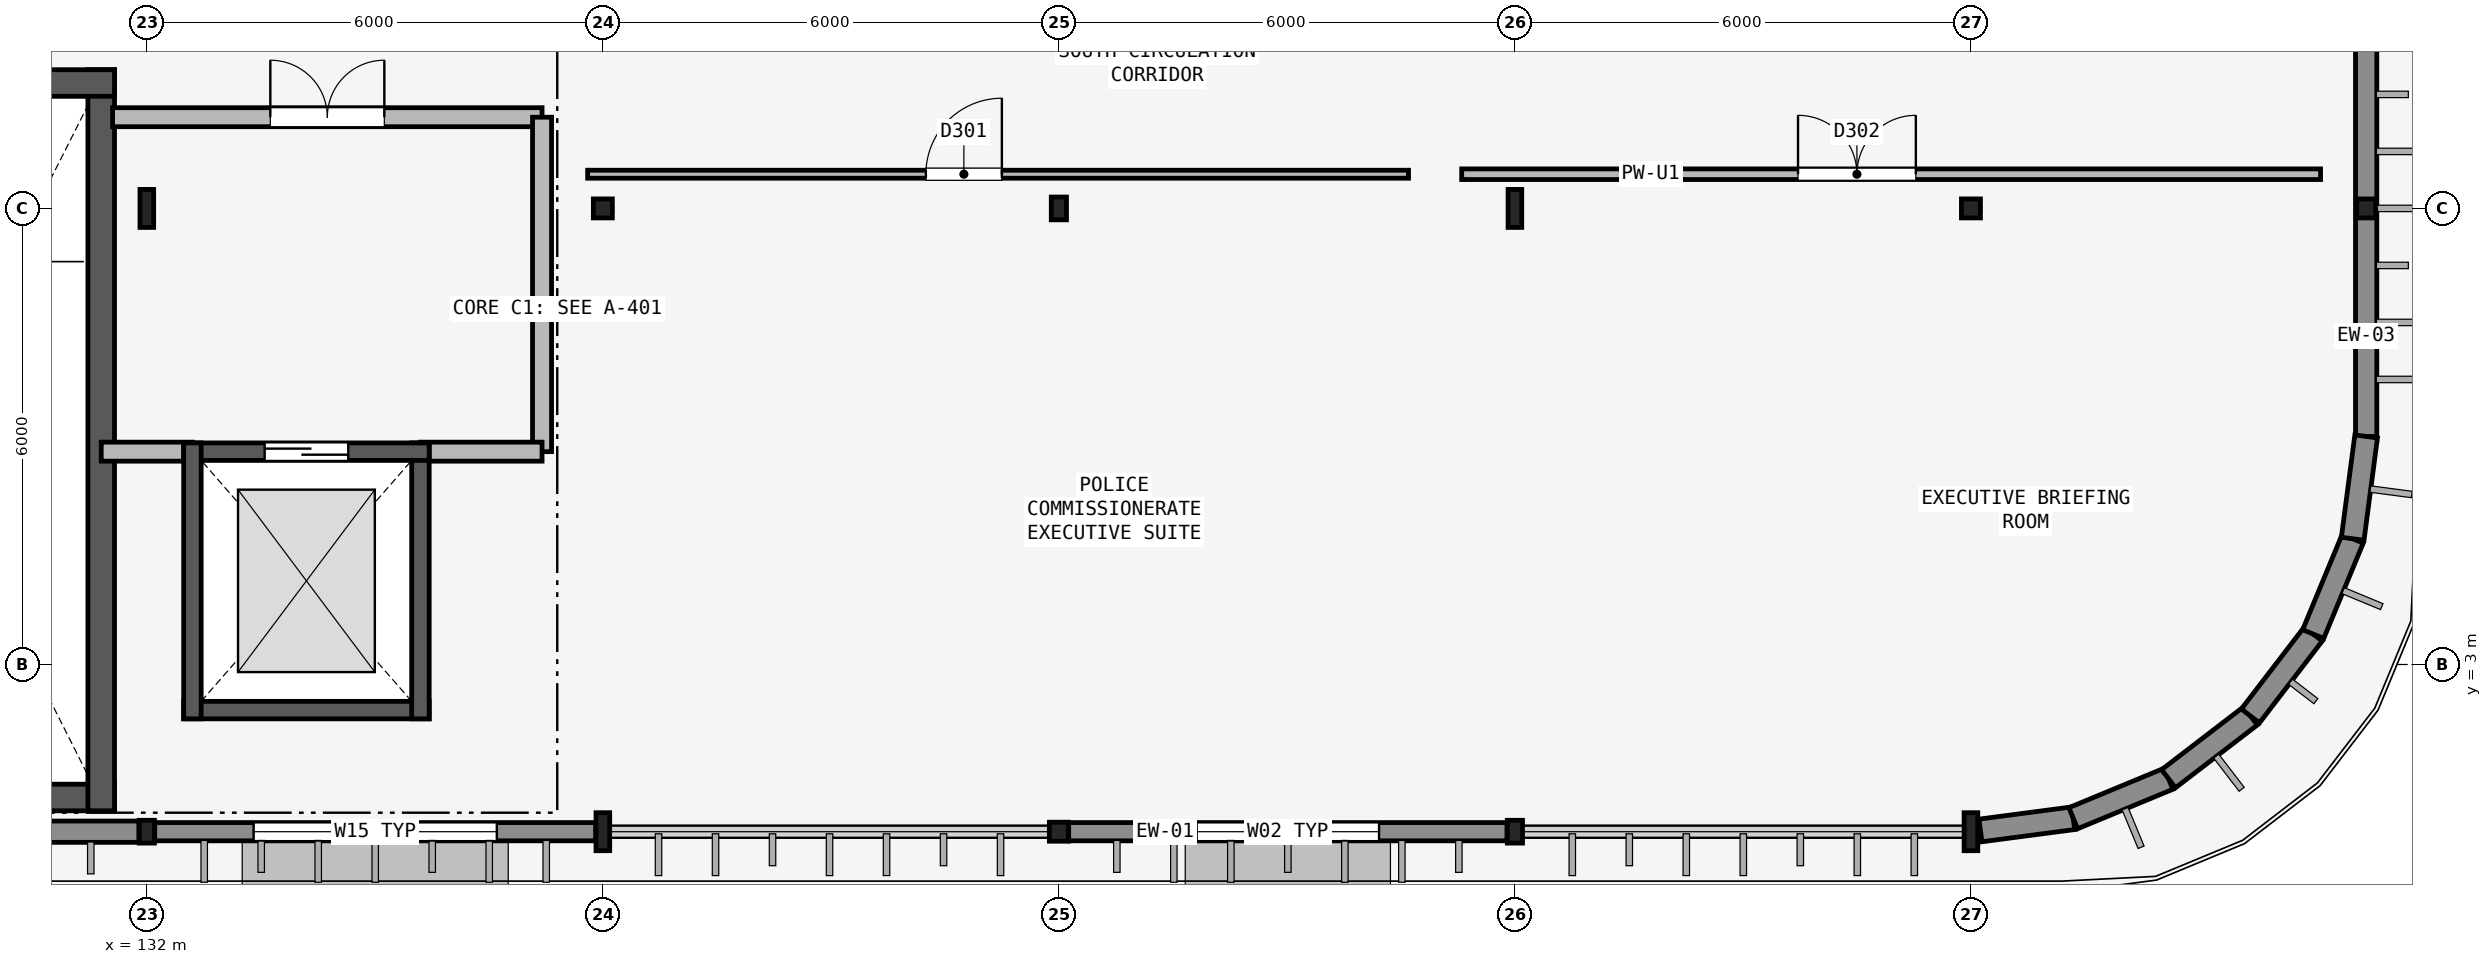
"""IFC4 building model, lengths in metres.
Left out: names, types, materials, properties, quantities, classifications, styles, units other than length and angle.
Written with IfcOpenShell. Run it as: python <this file> out.ifc"""

import sys

from ifc_helpers import new_model, si_unit, direction, frame, frame_2d, origin, origin_2d, place, context, subcontext, project, spatial, rectangle, hollow_rectangle, i_section, extrude, element, fill, save


model = new_model("IFC4")
c1 = context("Model", 3, precision=1e-05, world=origin(), true_north=direction((0.0, 1.0)))
c2 = subcontext(c1, "Body", "Model", "MODEL_VIEW")
j1 = project(units=[si_unit("LENGTHUNIT", "METRE"), si_unit("PLANEANGLEUNIT", "RADIAN")], contexts=[c1])
p1 = place(None, origin())
s1 = spatial("IfcSite", under=j1, at=p1, CompositionType="ELEMENT")
p2 = place(p1, origin())
s2 = spatial("IfcBuilding", under=s1, at=p2, CompositionType="ELEMENT")
p3 = place(p2, frame((0.0, 0.0, 30.0)))
s3 = spatial("IfcBuildingStorey", under=s2, at=p3, CompositionType="ELEMENT", Elevation=30.0)
p4 = place(p3, frame((132.0, 0.8, 0.0), z_axis=(0.0, 0.0, 1.0), x_axis=(1.0, 0.0, 0.0)))
e1 = element("IfcColumn", 1, at=p4, inside=s3, PredefinedType="COLUMN", context=c2, shape_type="SweptSolid", body=[
    extrude(hollow_rectangle(XDim=0.2, YDim=0.3, WallThickness=0.012, InnerFilletRadius=0.012, OuterFilletRadius=0.024, at=origin_2d()), origin(), (0.0, 0.0, 1.0), 4.2),
])
for number, where, z_axis, x_axis in (
    (2, (132.0, 9.0, 0.0), (0.0, 0.0, 1.0), (1.0, 0.0, 0.0)),
    (3, (138.0, 0.8, 0.0), (0.0, 0.0, 1.0), (1.0, 0.0, 0.0)),
):
    element("IfcColumn", number, at=place(p3, frame(where, z_axis=z_axis, x_axis=x_axis)), inside=s3, PredefinedType="COLUMN", context=c2, shape_type="SweptSolid", body=[
        extrude(i_section(OverallWidth=0.18, OverallDepth=0.5, WebThickness=0.01, FlangeThickness=0.017, FilletRadius=0.017, at=origin_2d()), origin(), (0.0, 0.0, 1.0), 4.2),
    ])
for number, where, z_axis, x_axis in (
    (4, (138.0, 9.0, 0.0), (0.0, 0.0, 1.0), (1.0, 0.0, 0.0)),
    (5, (144.0, 0.8, 0.0), (0.0, 0.0, 1.0), (1.0, 0.0, 0.0)),
):
    element("IfcColumn", number, at=place(p3, frame(where, z_axis=z_axis, x_axis=x_axis)), inside=s3, PredefinedType="COLUMN", context=c2, shape_type="SweptSolid", body=[
        extrude(hollow_rectangle(XDim=0.25, YDim=0.25, WallThickness=0.012, InnerFilletRadius=0.012, OuterFilletRadius=0.024, at=origin_2d()), origin(), (0.0, 0.0, 1.0), 4.2),
    ])
for number, where, z_axis, x_axis in (
    (6, (144.0, 9.0, 0.0), (0.0, 0.0, 1.0), (1.0, 0.0, 0.0)),
    (7, (150.0, 0.8, 0.0), (0.0, 0.0, 1.0), (1.0, 0.0, 0.0)),
):
    element("IfcColumn", number, at=place(p3, frame(where, z_axis=z_axis, x_axis=x_axis)), inside=s3, PredefinedType="COLUMN", context=c2, shape_type="SweptSolid", body=[
        extrude(hollow_rectangle(XDim=0.2, YDim=0.3, WallThickness=0.012, InnerFilletRadius=0.012, OuterFilletRadius=0.024, at=origin_2d()), origin(), (0.0, 0.0, 1.0), 4.2),
    ])
for number, where, z_axis, x_axis in (
    (8, (150.0, 9.0, 0.0), (0.0, 0.0, 1.0), (1.0, 0.0, 0.0)),
    (9, (156.0, 0.8, 0.0), (0.0, 0.0, 1.0), (1.0, 0.0, 0.0)),
):
    element("IfcColumn", number, at=place(p3, frame(where, z_axis=z_axis, x_axis=x_axis)), inside=s3, PredefinedType="COLUMN", context=c2, shape_type="SweptSolid", body=[
        extrude(i_section(OverallWidth=0.18, OverallDepth=0.5, WebThickness=0.01, FlangeThickness=0.017, FilletRadius=0.017, at=origin_2d()), origin(), (0.0, 0.0, 1.0), 4.2),
    ])
for number, where, z_axis, x_axis in (
    (10, (156.0, 9.0, 0.0), (0.0, 0.0, 1.0), (1.0, 0.0, 0.0)),
    (11, (161.2, 9.0, 0.0), (0.0, 0.0, 1.0), (1.0, 0.0, 0.0)),
):
    element("IfcColumn", number, at=place(p3, frame(where, z_axis=z_axis, x_axis=x_axis)), inside=s3, PredefinedType="COLUMN", context=c2, shape_type="SweptSolid", body=[
        extrude(hollow_rectangle(XDim=0.25, YDim=0.25, WallThickness=0.012, InnerFilletRadius=0.012, OuterFilletRadius=0.024, at=origin_2d()), origin(), (0.0, 0.0, 1.0), 4.2),
    ])
p5 = place(p3, frame((126.129, 0.8, 0.0), z_axis=(0.0, 0.0, 1.0), x_axis=(1.0, 0.0, 0.0)))
e12 = element("IfcWall", 12, at=p5, inside=s3, PredefinedType="SOLIDWALL", context=c2, shape_type="SweptSolid", body=[
    extrude(rectangle(XDim=5.767, YDim=0.28, at=frame_2d((2.884, 0.0))), origin(), (0.0, 0.0, 1.0), 3.624),
])
p6 = place(p3, frame((132.104, 0.8, 0.0), z_axis=(0.0, 0.0, 1.0), x_axis=(1.0, 0.0, 0.0)))
e13 = element("IfcWall", 13, at=p6, inside=s3, PredefinedType="SOLIDWALL", context=c2, shape_type="SweptSolid", body=[
    extrude(rectangle(XDim=5.802, YDim=0.24, at=frame_2d((2.901, 0.0))), origin(), (0.0, 0.0, 1.0), 3.624),
])
p7 = place(p6, frame((1.301, 0.0, 0.8)))
e14 = element("IfcOpeningElement", 14, at=p7, cuts=e13, PredefinedType="OPENING", context=c2, shape_type="SweptSolid", body=[
    extrude(rectangle(XDim=3.2, YDim=1.8, at=frame_2d((1.6, 0.9))), frame((0.0, 0.13, 0.0), z_axis=(0.0, -1.0, 0.0), x_axis=(1.0, 0.0, 0.0)), (0.0, 0.0, 1.0), 0.26),
])
p8 = place(p3, frame((144.129, 0.8, 0.0), z_axis=(0.0, 0.0, 1.0), x_axis=(1.0, 0.0, 0.0)))
e15 = element("IfcWall", 15, at=p8, inside=s3, PredefinedType="SOLIDWALL", context=c2, shape_type="SweptSolid", body=[
    extrude(rectangle(XDim=5.767, YDim=0.24, at=frame_2d((2.884, 0.0))), origin(), (0.0, 0.0, 1.0), 3.624),
])
p9 = place(p8, frame((1.684, 0.0, 0.9)))
e16 = element("IfcOpeningElement", 16, at=p9, cuts=e15, PredefinedType="OPENING", context=c2, shape_type="SweptSolid", body=[
    extrude(rectangle(XDim=2.4, YDim=1.5, at=frame_2d((1.2, 0.75))), frame((0.0, 0.13, 0.0), z_axis=(0.0, -1.0, 0.0), x_axis=(1.0, 0.0, 0.0)), (0.0, 0.0, 1.0), 0.26),
])
p10 = place(p3, frame((161.2, 6.0, 0.0), z_axis=(0.0, 0.0, 1.0), x_axis=(0.0, 1.0, 0.0)))
e17 = element("IfcWall", 17, at=p10, inside=s3, PredefinedType="SOLIDWALL", context=c2, shape_type="SweptSolid", body=[
    extrude(rectangle(XDim=6.0, YDim=0.28, at=frame_2d((3.0, 0.0))), origin(), (0.0, 0.0, 1.0), 3.58),
])
p11 = place(p3, frame((156.125, 0.816, 0.0), z_axis=(0.0, 0.0, 1.0), x_axis=(0.991432693702, 0.130618581597, 0.0)))
e18 = element("IfcWall", 18, at=p11, inside=s3, PredefinedType="SOLIDWALL", context=c2, shape_type="SweptSolid", body=[
    extrude(rectangle(XDim=1.232, YDim=0.3, at=frame_2d((0.616, 0.0))), origin(), (0.0, 0.0, 1.0), 3.624),
])
for number, where, z_axis, x_axis in (
    (19, (157.346, 0.977, 0.0), (0.0, 0.0, 1.0), (0.924, 0.383, 0.0)),
    (20, (158.6, 1.497, 0.0), (0.0, 0.0, 1.0), (0.793, 0.609, 0.0)),
    (21, (159.677, 2.323, 0.0), (0.0, 0.0, 1.0), (0.609, 0.793, 0.0)),
    (22, (160.503, 3.4, 0.0), (0.0, 0.0, 1.0), (0.383, 0.924, 0.0)),
):
    element("IfcWall", number, at=place(p3, frame(where, z_axis=z_axis, x_axis=x_axis)), inside=s3, PredefinedType="SOLIDWALL", context=c2, shape_type="SweptSolid", body=[
        extrude(rectangle(XDim=1.357, YDim=0.3, at=frame_2d((0.679, 0.0))), origin(), (0.0, 0.0, 1.0), 4.035),
    ])
p12 = place(p3, frame((161.023, 4.654, 0.0), z_axis=(0.0, 0.0, 1.0), x_axis=(0.130561507967, 0.991440211328, 0.0)))
e23 = element("IfcWall", 23, at=p12, inside=s3, PredefinedType="SOLIDWALL", context=c2, shape_type="SweptSolid", body=[
    extrude(rectangle(XDim=1.358, YDim=0.3, at=frame_2d((0.679, 0.0))), origin(), (0.0, 0.0, 1.0), 4.035),
])
p13 = place(p3, frame((126.425, 1.25, 0.0), z_axis=(0.0, 0.0, 1.0), x_axis=(1.0, 0.0, 0.0)))
e24 = element("IfcWall", 24, at=p13, inside=s3, PredefinedType="SHEAR", context=c2, shape_type="SweptSolid", body=[
    extrude(rectangle(XDim=5.15, YDim=0.35, at=frame_2d((2.575, 0.0))), origin(), (0.0, 0.0, 1.0), 4.06),
])
p14 = place(p3, frame((131.4, 1.075, 0.0), z_axis=(0.0, 0.0, 1.0), x_axis=(0.0, 1.0, 0.0)))
e25 = element("IfcWall", 25, at=p14, inside=s3, PredefinedType="SHEAR", context=c2, shape_type="SweptSolid", body=[
    extrude(rectangle(XDim=9.75, YDim=0.35, at=frame_2d((4.875, 0.0))), origin(), (0.0, 0.0, 1.0), 4.06),
])
p15 = place(p3, frame((131.575, 10.65, 0.0), z_axis=(0.0, 0.0, 1.0), x_axis=(-1.0, 0.0, 0.0)))
e26 = element("IfcWall", 26, at=p15, inside=s3, PredefinedType="SHEAR", context=c2, shape_type="SweptSolid", body=[
    extrude(rectangle(XDim=5.15, YDim=0.35, at=frame_2d((2.575, 0.0))), origin(), (0.0, 0.0, 1.0), 4.06),
])
p16 = place(p15, frame((1.675, 0.0, 0.0)))
e27 = element("IfcOpeningElement", 27, at=p16, cuts=e26, PredefinedType="OPENING", context=c2, shape_type="SweptSolid", body=[
    extrude(rectangle(XDim=1.8, YDim=2.2, at=frame_2d((0.9, 1.1))), frame((0.0, 0.185, 0.0), z_axis=(0.0, -1.0, 0.0), x_axis=(1.0, 0.0, 0.0)), (0.0, 0.0, 1.0), 0.37),
])
p17 = place(p3, frame((131.55, 10.2, 0.0), z_axis=(0.0, 0.0, 1.0), x_axis=(1.0, 0.0, 0.0)))
e28 = element("IfcWall", 28, at=p17, inside=s3, PredefinedType="PARTITIONING", context=c2, shape_type="SweptSolid", body=[
    extrude(rectangle(XDim=5.65, YDim=0.25, at=frame_2d((2.825, 0.0))), origin(), (0.0, 0.0, 1.0), 3.68),
])
p18 = place(p17, frame((2.075, 0.0, 0.0)))
e29 = element("IfcOpeningElement", 29, at=p18, cuts=e28, PredefinedType="OPENING", context=c2, shape_type="SweptSolid", body=[
    extrude(rectangle(XDim=1.5, YDim=2.15, at=frame_2d((0.75, 1.075))), frame((0.0, 0.135, 0.0), z_axis=(0.0, -1.0, 0.0), x_axis=(1.0, 0.0, 0.0)), (0.0, 0.0, 1.0), 0.27),
])
p19 = place(p3, frame((137.2, 5.8, 0.0), z_axis=(0.0, 0.0, 1.0), x_axis=(0.0, 1.0, 0.0)))
e30 = element("IfcWall", 30, at=p19, inside=s3, PredefinedType="PARTITIONING", context=c2, shape_type="SweptSolid", body=[
    extrude(rectangle(XDim=4.4, YDim=0.25, at=frame_2d((2.2, 0.0))), origin(), (0.0, 0.0, 1.0), 3.43),
])
p20 = place(p3, frame((135.6, 5.8, 0.0), z_axis=(0.0, 0.0, 1.0), x_axis=(1.0, 0.0, 0.0)))
e31 = element("IfcWall", 31, at=p20, inside=s3, PredefinedType="PARTITIONING", context=c2, shape_type="SweptSolid", body=[
    extrude(rectangle(XDim=1.6, YDim=0.25, at=frame_2d((0.8, 0.0))), origin(), (0.0, 0.0, 1.0), 4.03),
])
p21 = place(p3, frame((131.4, 5.8, 0.0), z_axis=(0.0, 0.0, 1.0), x_axis=(1.0, 0.0, 0.0)))
e32 = element("IfcWall", 32, at=p21, inside=s3, PredefinedType="PARTITIONING", context=c2, shape_type="SweptSolid", body=[
    extrude(rectangle(XDim=1.2, YDim=0.25, at=frame_2d((0.6, 0.0))), origin(), (0.0, 0.0, 1.0), 3.624),
])
p22 = place(p3, frame((132.485, 2.4, 0.0), z_axis=(0.0, 0.0, 1.0), x_axis=(1.0, 0.0, 0.0)))
e33 = element("IfcWall", 33, at=p22, inside=s3, PredefinedType="SHEAR", context=c2, shape_type="SweptSolid", body=[
    extrude(rectangle(XDim=3.23, YDim=0.23, at=frame_2d((1.615, 0.0))), origin(), (0.0, 0.0, 1.0), 4.2),
])
p23 = place(p3, frame((135.6, 2.285, 0.0), z_axis=(0.0, 0.0, 1.0), x_axis=(0.0, 1.0, 0.0)))
e34 = element("IfcWall", 34, at=p23, inside=s3, PredefinedType="SHEAR", context=c2, shape_type="SweptSolid", body=[
    extrude(rectangle(XDim=3.63, YDim=0.23, at=frame_2d((1.815, 0.0))), origin(), (0.0, 0.0, 1.0), 4.2),
])
p24 = place(p3, frame((135.715, 5.8, 0.0), z_axis=(0.0, 0.0, 1.0), x_axis=(-1.0, 0.0, 0.0)))
e35 = element("IfcWall", 35, at=p24, inside=s3, PredefinedType="SHEAR", context=c2, shape_type="SweptSolid", body=[
    extrude(rectangle(XDim=3.23, YDim=0.23, at=frame_2d((1.615, 0.0))), origin(), (0.0, 0.0, 1.0), 4.2),
])
p25 = place(p24, frame((1.065, 0.0, 0.0)))
e36 = element("IfcOpeningElement", 36, at=p25, cuts=e35, PredefinedType="OPENING", context=c2, shape_type="SweptSolid", body=[
    extrude(rectangle(XDim=1.1, YDim=2.2, at=frame_2d((0.55, 1.1))), frame((0.0, 0.125, 0.0), z_axis=(0.0, -1.0, 0.0), x_axis=(1.0, 0.0, 0.0)), (0.0, 0.0, 1.0), 0.25),
])
p26 = place(p3, frame((132.6, 5.915, 0.0), z_axis=(0.0, 0.0, 1.0), x_axis=(0.0, -1.0, 0.0)))
e37 = element("IfcWall", 37, at=p26, inside=s3, PredefinedType="SHEAR", context=c2, shape_type="SweptSolid", body=[
    extrude(rectangle(XDim=3.63, YDim=0.23, at=frame_2d((1.815, 0.0))), origin(), (0.0, 0.0, 1.0), 4.2),
])
p27 = place(p3, frame((137.8, 9.45, 0.0), z_axis=(0.0, 0.0, 1.0), x_axis=(1.0, 0.0, 0.0)))
e38 = element("IfcWall", 38, at=p27, inside=s3, PredefinedType="PARTITIONING", context=c2, shape_type="SweptSolid", body=[
    extrude(rectangle(XDim=10.8, YDim=0.105, at=frame_2d((5.4, 0.0))), origin(), (0.0, 0.0, 1.0), 3.63),
])
p28 = place(p27, frame((4.45, 0.0, 0.0)))
e39 = element("IfcOpeningElement", 39, at=p28, cuts=e38, PredefinedType="OPENING", context=c2, shape_type="SweptSolid", body=[
    extrude(rectangle(XDim=1.0, YDim=2.15, at=frame_2d((0.5, 1.075))), frame((0.0, 0.062, 0.0), z_axis=(0.0, -1.0, 0.0), x_axis=(1.0, 0.0, 0.0)), (0.0, 0.0, 1.0), 0.125),
])
p29 = place(p3, frame((149.3, 9.45, 0.0), z_axis=(0.0, 0.0, 1.0), x_axis=(1.0, 0.0, 0.0)))
e40 = element("IfcWall", 40, at=p29, inside=s3, PredefinedType="PARTITIONING", context=c2, shape_type="SweptSolid", body=[
    extrude(rectangle(XDim=11.3, YDim=0.14, at=frame_2d((5.65, 0.0))), origin(), (0.0, 0.0, 1.0), 3.68),
])
p30 = place(p29, frame((4.425, 0.0, 0.0)))
e41 = element("IfcOpeningElement", 41, at=p30, cuts=e40, PredefinedType="OPENING", context=c2, shape_type="SweptSolid", body=[
    extrude(rectangle(XDim=1.55, YDim=2.2, at=frame_2d((0.775, 1.1))), frame((0.0, 0.08, 0.0), z_axis=(0.0, -1.0, 0.0), x_axis=(1.0, 0.0, 0.0)), (0.0, 0.0, 1.0), 0.16),
])
p31 = place(p7, origin())
e42 = element("IfcWindow", 42, at=p31, inside=s3, PartitioningType="SINGLE_PANEL", PredefinedType="WINDOW", context=c2, shape_type="SweptSolid", body=[
    extrude(rectangle(XDim=3.2, YDim=1.8, at=frame_2d((1.6, 0.9))), frame((0.0, 0.03, 0.0), z_axis=(0.0, -1.0, 0.0), x_axis=(1.0, 0.0, 0.0)), (0.0, 0.0, 1.0), 0.06),
])
fill(e14, e42)
p32 = place(p9, origin())
e43 = element("IfcWindow", 43, at=p32, inside=s3, PartitioningType="SINGLE_PANEL", PredefinedType="WINDOW", context=c2, shape_type="SweptSolid", body=[
    extrude(rectangle(XDim=2.4, YDim=1.5, at=frame_2d((1.2, 0.75))), frame((0.0, 0.03, 0.0), z_axis=(0.0, -1.0, 0.0), x_axis=(1.0, 0.0, 0.0)), (0.0, 0.0, 1.0), 0.06),
])
fill(e16, e43)
p33 = place(p18, origin())
e44 = element("IfcDoor", 44, at=p33, inside=s3, OperationType="DOUBLE_DOOR_SINGLE_SWING", PredefinedType="DOOR", context=c2, shape_type="SweptSolid", body=[
    extrude(rectangle(XDim=1.5, YDim=2.15, at=frame_2d((0.75, 1.075))), frame((0.0, 0.025, 0.0), z_axis=(0.0, -1.0, 0.0), x_axis=(1.0, 0.0, 0.0)), (0.0, 0.0, 1.0), 0.05),
])
fill(e29, e44)
p34 = place(p25, origin())
e45 = element("IfcDoor", 45, at=p34, inside=s3, OperationType="SLIDING_TO_LEFT", PredefinedType="DOOR", context=c2, shape_type="SweptSolid", body=[
    extrude(rectangle(XDim=1.1, YDim=2.2, at=frame_2d((0.55, 1.1))), frame((0.0, 0.025, 0.0), z_axis=(0.0, -1.0, 0.0), x_axis=(1.0, 0.0, 0.0)), (0.0, 0.0, 1.0), 0.05),
])
fill(e36, e45)
p35 = place(p28, origin())
e46 = element("IfcDoor", 46, at=p35, inside=s3, OperationType="SINGLE_SWING_RIGHT", PredefinedType="DOOR", context=c2, shape_type="SweptSolid", body=[
    extrude(rectangle(XDim=1.0, YDim=2.15, at=frame_2d((0.5, 1.075))), frame((0.0, 0.025, 0.0), z_axis=(0.0, -1.0, 0.0), x_axis=(1.0, 0.0, 0.0)), (0.0, 0.0, 1.0), 0.05),
])
fill(e39, e46)
p36 = place(p30, origin())
e47 = element("IfcDoor", 47, at=p36, inside=s3, OperationType="DOUBLE_DOOR_SINGLE_SWING", PredefinedType="DOOR", context=c2, shape_type="SweptSolid", body=[
    extrude(rectangle(XDim=1.55, YDim=2.2, at=frame_2d((0.775, 1.1))), frame((0.0, 0.025, 0.0), z_axis=(0.0, -1.0, 0.0), x_axis=(1.0, 0.0, 0.0)), (0.0, 0.0, 1.0), 0.05),
])
fill(e41, e47)
save(model, sys.argv[1])
